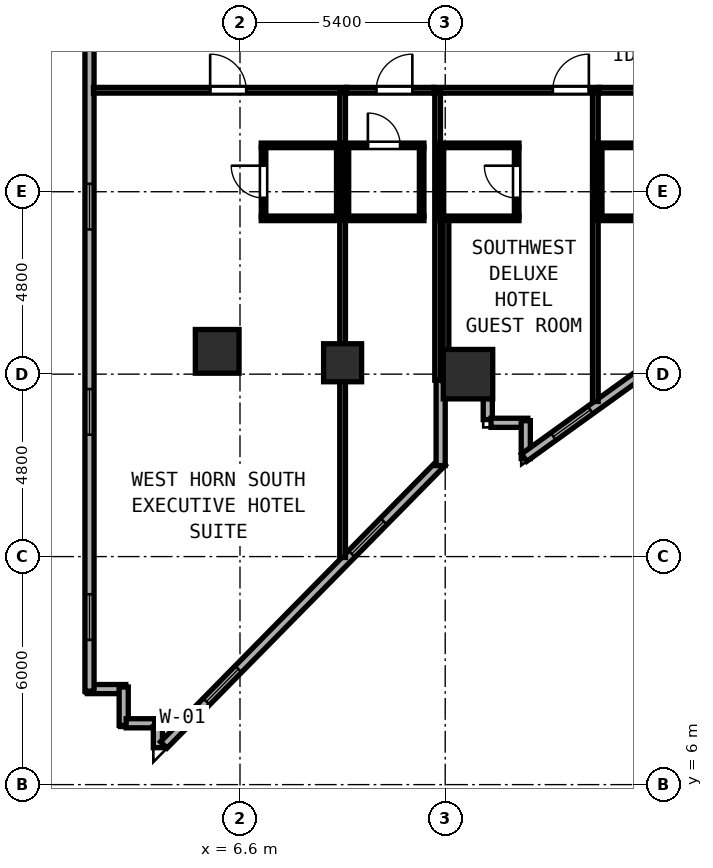
"""IFC4 building model, lengths in metres.
Left out: names, types, materials, properties, quantities, classifications, styles, units other than length and angle.
Written with IfcOpenShell. Run it as: python <this file> out.ifc"""

import sys

from ifc_helpers import new_model, si_unit, direction, frame, frame_2d, origin, origin_2d, place, context, subcontext, project, spatial, rectangle, hollow_rectangle, extrude, element, fill, save


model = new_model("IFC4")
c1 = context("Model", 3, precision=1e-05, world=origin(), true_north=direction((0.0, 1.0)))
c2 = subcontext(c1, "Body", "Model", "MODEL_VIEW")
j1 = project(units=[si_unit("LENGTHUNIT", "METRE"), si_unit("PLANEANGLEUNIT", "RADIAN")], contexts=[c1])
p1 = place(None, origin())
s1 = spatial("IfcSite", under=j1, at=p1, CompositionType="ELEMENT")
p2 = place(p1, origin())
s2 = spatial("IfcBuilding", under=s1, at=p2, CompositionType="ELEMENT")
p3 = place(p2, frame((0.0, 0.0, 39.2)))
s3 = spatial("IfcBuildingStorey", under=s2, at=p3, CompositionType="ELEMENT", Elevation=39.2)
p4 = place(p3, frame((12.6, 16.8, 0.0), z_axis=(0.0, 0.0, 1.0), x_axis=(1.0, 0.0, 0.0)))
e1 = element("IfcColumn", 1, at=p4, inside=s3, PredefinedType="COLUMN", context=c2, shape_type="SweptSolid", body=[
    extrude(hollow_rectangle(XDim=1.3, YDim=1.3, WallThickness=0.048, at=origin_2d()), origin(), (0.0, 0.0, 1.0), 3.8),
])
p5 = place(p3, frame((6.0, 17.4, 0.0), z_axis=(0.0, 0.0, 1.0), x_axis=(1.0, 0.0, 0.0)))
e2 = element("IfcColumn", 2, at=p5, inside=s3, PredefinedType="COLUMN", context=c2, shape_type="SweptSolid", body=[
    extrude(hollow_rectangle(XDim=1.15, YDim=1.15, WallThickness=0.042, at=origin_2d()), origin(), (0.0, 0.0, 1.0), 3.8),
])
p6 = place(p3, frame((9.3, 17.1, 0.0), z_axis=(0.0, 0.0, 1.0), x_axis=(1.0, 0.0, 0.0)))
e3 = element("IfcColumn", 3, at=p6, inside=s3, PredefinedType="COLUMN", context=c2, shape_type="SweptSolid", body=[
    extrude(hollow_rectangle(XDim=1.0, YDim=1.0, WallThickness=0.038, at=origin_2d()), origin(), (0.0, 0.0, 1.0), 3.8),
])
for number, where, z_axis, x_axis in (
    (4, (2.585, 8.514, 0.0), (0.0, 0.0, 1.0), (1.0, 0.0, 0.0)),
    (5, (3.54, 8.569, 0.0), (0.0, 0.0, 1.0), (0.0, -1.0, 0.0)),
):
    element("IfcWall", number, at=place(p3, frame(where, z_axis=z_axis, x_axis=x_axis)), inside=s3, PredefinedType="SOLIDWALL", context=c2, shape_type="SweptSolid", body=[
        extrude(rectangle(XDim=1.01, YDim=0.24, at=frame_2d((0.505, 0.0))), origin(), (0.0, 0.0, 1.0), 3.54),
    ])
p7 = place(p3, frame((3.605, 7.614, 0.0), z_axis=(0.0, 0.0, 1.0), x_axis=(1.0, 0.0, 0.0)))
e6 = element("IfcWall", 6, at=p7, inside=s3, PredefinedType="SOLIDWALL", context=c2, shape_type="SweptSolid", body=[
    extrude(rectangle(XDim=0.75, YDim=0.24, at=frame_2d((0.375, 0.0))), origin(), (0.0, 0.0, 1.0), 3.54),
])
p8 = place(p3, frame((4.44, 7.529, 0.0), z_axis=(0.0, 0.0, 1.0), x_axis=(0.0, -1.0, 0.0)))
e7 = element("IfcWall", 7, at=p8, inside=s3, PredefinedType="SOLIDWALL", context=c2, shape_type="SweptSolid", body=[
    extrude(rectangle(XDim=0.557, YDim=0.24, at=frame_2d((0.278, 0.0))), origin(), (0.0, 0.0, 1.0), 3.54),
])
p9 = place(p3, frame((4.594, 7.044, 0.0), z_axis=(0.0, 0.0, 1.0), x_axis=(0.701344347017, 0.712822633554, 0.0)))
e8 = element("IfcWall", 8, at=p9, inside=s3, PredefinedType="SOLIDWALL", context=c2, shape_type="SweptSolid", body=[
    extrude(rectangle(XDim=10.443, YDim=0.24, at=frame_2d((5.222, 0.0))), origin(), (0.0, 0.0, 1.0), 3.54),
])
p10 = place(p9, frame((1.6, 0.0, 0.85)))
e9 = element("IfcOpeningElement", 9, at=p10, cuts=e8, PredefinedType="OPENING", context=c2, shape_type="SweptSolid", body=[
    extrude(rectangle(XDim=1.2, YDim=1.85, at=frame_2d((0.6, 0.925))), frame((0.0, 0.13, 0.0), z_axis=(0.0, -1.0, 0.0), x_axis=(1.0, 0.0, 0.0)), (0.0, 0.0, 1.0), 0.26),
])
p11 = place(p9, frame((7.052, 0.0, 0.85)))
e10 = element("IfcOpeningElement", 10, at=p11, cuts=e8, PredefinedType="OPENING", context=c2, shape_type="SweptSolid", body=[
    extrude(rectangle(XDim=1.2, YDim=1.85, at=frame_2d((0.6, 0.925))), frame((0.0, 0.13, 0.0), z_axis=(0.0, -1.0, 0.0), x_axis=(1.0, 0.0, 0.0)), (0.0, 0.0, 1.0), 0.26),
])
p12 = place(p3, frame((11.88, 14.394, 0.0), z_axis=(0.0, 0.0, 1.0), x_axis=(0.0, 1.0, 0.0)))
e11 = element("IfcWall", 11, at=p12, inside=s3, PredefinedType="SOLIDWALL", context=c2, shape_type="SweptSolid", body=[
    extrude(rectangle(XDim=2.246, YDim=0.24, at=frame_2d((1.123, 0.0))), origin(), (0.0, 0.0, 1.0), 3.54),
])
p13 = place(p3, frame((13.12, 16.158, 0.0), z_axis=(0.0, 0.0, 1.0), x_axis=(0.0, -1.0, 0.0)))
e12 = element("IfcWall", 12, at=p13, inside=s3, PredefinedType="SOLIDWALL", context=c2, shape_type="SweptSolid", body=[
    extrude(rectangle(XDim=0.553, YDim=0.24, at=frame_2d((0.276, 0.0))), origin(), (0.0, 0.0, 1.0), 3.54),
])
p14 = place(p3, frame((13.205, 15.52, 0.0), z_axis=(0.0, 0.0, 1.0), x_axis=(1.0, 0.0, 0.0)))
e13 = element("IfcWall", 13, at=p14, inside=s3, PredefinedType="SOLIDWALL", context=c2, shape_type="SweptSolid", body=[
    extrude(rectangle(XDim=0.97, YDim=0.24, at=frame_2d((0.485, 0.0))), origin(), (0.0, 0.0, 1.0), 3.54),
])
p15 = place(p3, frame((14.12, 15.575, 0.0), z_axis=(0.0, 0.0, 1.0), x_axis=(0.0, -1.0, 0.0)))
e14 = element("IfcWall", 14, at=p15, inside=s3, PredefinedType="SOLIDWALL", context=c2, shape_type="SweptSolid", body=[
    extrude(rectangle(XDim=0.996, YDim=0.24, at=frame_2d((0.498, 0.0))), origin(), (0.0, 0.0, 1.0), 3.54),
])
p16 = place(p3, frame((14.075, 14.602, 0.0), z_axis=(0.0, 0.0, 1.0), x_axis=(0.811535555989, 0.584303038984, 0.0)))
e15 = element("IfcWall", 15, at=p16, inside=s3, PredefinedType="SOLIDWALL", context=c2, shape_type="SweptSolid", body=[
    extrude(rectangle(XDim=11.438, YDim=0.24, at=frame_2d((5.719, 0.0))), origin(), (0.0, 0.0, 1.0), 3.037),
])
p17 = place(p16, frame((0.95, 0.0, 0.85)))
e16 = element("IfcOpeningElement", 16, at=p17, cuts=e15, PredefinedType="OPENING", context=c2, shape_type="SweptSolid", body=[
    extrude(rectangle(XDim=1.2, YDim=1.85, at=frame_2d((0.6, 0.925))), frame((0.0, 0.13, 0.0), z_axis=(0.0, -1.0, 0.0), x_axis=(1.0, 0.0, 0.0)), (0.0, 0.0, 1.0), 0.26),
])
p18 = place(p16, frame((7.574, 0.0, 0.85)))
e17 = element("IfcOpeningElement", 17, at=p18, cuts=e15, PredefinedType="OPENING", context=c2, shape_type="SweptSolid", body=[
    extrude(rectangle(XDim=1.2, YDim=1.85, at=frame_2d((0.6, 0.925))), frame((0.0, 0.13, 0.0), z_axis=(0.0, -1.0, 0.0), x_axis=(1.0, 0.0, 0.0)), (0.0, 0.0, 1.0), 0.26),
])
p19 = place(p16, frame((4.262, 0.0, 0.85)))
e18 = element("IfcOpeningElement", 18, at=p19, cuts=e15, PredefinedType="OPENING", context=c2, shape_type="SweptSolid", body=[
    extrude(rectangle(XDim=1.2, YDim=1.85, at=frame_2d((0.6, 0.925))), frame((0.0, 0.13, 0.0), z_axis=(0.0, -1.0, 0.0), x_axis=(1.0, 0.0, 0.0)), (0.0, 0.0, 1.0), 0.26),
])
p20 = place(p3, frame((2.64, 28.808, 0.0), z_axis=(0.0, 0.0, 1.0), x_axis=(0.0, -1.0, 0.0)))
e19 = element("IfcWall", 19, at=p20, inside=s3, PredefinedType="SOLIDWALL", context=c2, shape_type="SweptSolid", body=[
    extrude(rectangle(XDim=20.349, YDim=0.24, at=frame_2d((10.175, 0.0))), origin(), (0.0, 0.0, 1.0), 3.54),
])
p21 = place(p20, frame((1.093, 0.0, 0.85)))
e20 = element("IfcOpeningElement", 20, at=p21, cuts=e19, PredefinedType="OPENING", context=c2, shape_type="SweptSolid", body=[
    extrude(rectangle(XDim=1.2, YDim=1.85, at=frame_2d((0.6, 0.925))), frame((0.0, 0.13, 0.0), z_axis=(0.0, -1.0, 0.0), x_axis=(1.0, 0.0, 0.0)), (0.0, 0.0, 1.0), 0.26),
])
p22 = place(p20, frame((7.0, 0.0, 0.85)))
e21 = element("IfcOpeningElement", 21, at=p22, cuts=e19, PredefinedType="OPENING", context=c2, shape_type="SweptSolid", body=[
    extrude(rectangle(XDim=1.2, YDim=1.85, at=frame_2d((0.6, 0.925))), frame((0.0, 0.13, 0.0), z_axis=(0.0, -1.0, 0.0), x_axis=(1.0, 0.0, 0.0)), (0.0, 0.0, 1.0), 0.26),
])
p23 = place(p20, frame((12.4, 0.0, 0.85)))
e22 = element("IfcOpeningElement", 22, at=p23, cuts=e19, PredefinedType="OPENING", context=c2, shape_type="SweptSolid", body=[
    extrude(rectangle(XDim=1.2, YDim=1.85, at=frame_2d((0.6, 0.925))), frame((0.0, 0.13, 0.0), z_axis=(0.0, -1.0, 0.0), x_axis=(1.0, 0.0, 0.0)), (0.0, 0.0, 1.0), 0.26),
])
p24 = place(p20, frame((17.8, 0.0, 0.85)))
e23 = element("IfcOpeningElement", 23, at=p24, cuts=e19, PredefinedType="OPENING", context=c2, shape_type="SweptSolid", body=[
    extrude(rectangle(XDim=1.2, YDim=1.85, at=frame_2d((0.6, 0.925))), frame((0.0, 0.13, 0.0), z_axis=(0.0, -1.0, 0.0), x_axis=(1.0, 0.0, 0.0)), (0.0, 0.0, 1.0), 0.26),
])
p25 = place(p3, frame((11.7, 24.27, 0.0), z_axis=(0.0, 0.0, 1.0), x_axis=(1.0, 0.0, 0.0)))
e24 = element("IfcWall", 24, at=p25, inside=s3, PredefinedType="PARTITIONING", context=c2, shape_type="SweptSolid", body=[
    extrude(rectangle(XDim=4.35, YDim=0.15, at=frame_2d((2.175, 0.0))), origin(), (0.0, 0.0, 1.0), 3.54),
])
p26 = place(p25, frame((4.08, 0.0, 0.0), z_axis=(0.0, 0.0, 1.0), x_axis=(-1.0, 0.0, 0.0)))
e25 = element("IfcOpeningElement", 25, at=p26, cuts=e24, PredefinedType="OPENING", context=c2, shape_type="SweptSolid", body=[
    extrude(rectangle(XDim=0.95, YDim=2.15, at=frame_2d((0.475, 1.075))), frame((0.0, 0.085, 0.0), z_axis=(0.0, -1.0, 0.0), x_axis=(1.0, 0.0, 0.0)), (0.0, 0.0, 1.0), 0.17),
])
p27 = place(p3, frame((11.8, 16.642, 0.0), z_axis=(0.0, 0.0, 1.0), x_axis=(0.0, 1.0, 0.0)))
e26 = element("IfcWall", 26, at=p27, inside=s3, PredefinedType="PARTITIONING", context=c2, shape_type="SweptSolid", body=[
    extrude(rectangle(XDim=7.568, YDim=0.15, at=frame_2d((3.784, 0.0))), origin(), (0.0, 0.0, 1.0), 3.54),
])
p28 = place(p3, frame((15.95, 16.081, 0.0), z_axis=(0.0, 0.0, 1.0), x_axis=(0.0, 1.0, 0.0)))
e27 = element("IfcWall", 27, at=p28, inside=s3, PredefinedType="PARTITIONING", context=c2, shape_type="SweptSolid", body=[
    extrude(rectangle(XDim=8.129, YDim=0.15, at=frame_2d((4.064, 0.0))), origin(), (0.0, 0.0, 1.0), 3.54),
])
for number, where, z_axis, x_axis in (
    (28, (11.86, 22.82, 0.0), (0.0, 0.0, 1.0), (1.0, 0.0, 0.0)),
    (29, (11.86, 20.9, 0.0), (0.0, 0.0, 1.0), (1.0, 0.0, 0.0)),
):
    element("IfcWall", number, at=place(p3, frame(where, z_axis=z_axis, x_axis=x_axis)), inside=s3, PredefinedType="PARTITIONING", context=c2, shape_type="SweptSolid", body=[
        extrude(rectangle(XDim=2.08, YDim=0.12, at=frame_2d((1.04, 0.0))), origin(), (0.0, 0.0, 1.0), 3.54),
    ])
p29 = place(p3, frame((11.9, 20.945, 0.0), z_axis=(0.0, 0.0, 1.0), x_axis=(0.0, 1.0, 0.0)))
e30 = element("IfcWall", 30, at=p29, inside=s3, PredefinedType="PARTITIONING", context=c2, shape_type="SweptSolid", body=[
    extrude(rectangle(XDim=1.83, YDim=0.12, at=frame_2d((0.915, 0.0))), origin(), (0.0, 0.0, 1.0), 3.54),
])
p30 = place(p3, frame((13.88, 20.945, 0.0), z_axis=(0.0, 0.0, 1.0), x_axis=(0.0, 1.0, 0.0)))
e31 = element("IfcWall", 31, at=p30, inside=s3, PredefinedType="PARTITIONING", context=c2, shape_type="SweptSolid", body=[
    extrude(rectangle(XDim=1.83, YDim=0.12, at=frame_2d((0.915, 0.0))), origin(), (0.0, 0.0, 1.0), 3.54),
])
p31 = place(p30, frame((0.49, 0.0, 0.0)))
e32 = element("IfcOpeningElement", 32, at=p31, cuts=e31, PredefinedType="OPENING", context=c2, shape_type="SweptSolid", body=[
    extrude(rectangle(XDim=0.85, YDim=2.1, at=frame_2d((0.425, 1.05))), frame((0.0, 0.07, 0.0), z_axis=(0.0, -1.0, 0.0), x_axis=(1.0, 0.0, 0.0)), (0.0, 0.0, 1.0), 0.14),
])
p32 = place(p3, frame((16.052, 24.27, 0.0), z_axis=(0.0, 0.0, 1.0), x_axis=(1.0, 0.0, 0.0)))
e33 = element("IfcWall", 33, at=p32, inside=s3, PredefinedType="PARTITIONING", context=c2, shape_type="SweptSolid", body=[
    extrude(rectangle(XDim=4.018, YDim=0.15, at=frame_2d((2.009, 0.0))), origin(), (0.0, 0.0, 1.0), 3.54),
])
p33 = place(p32, frame((3.76, 0.0, 0.0), z_axis=(0.0, 0.0, 1.0), x_axis=(-1.0, 0.0, 0.0)))
e34 = element("IfcOpeningElement", 34, at=p33, cuts=e33, PredefinedType="OPENING", context=c2, shape_type="SweptSolid", body=[
    extrude(rectangle(XDim=0.95, YDim=2.15, at=frame_2d((0.475, 1.075))), frame((0.0, 0.085, 0.0), z_axis=(0.0, -1.0, 0.0), x_axis=(1.0, 0.0, 0.0)), (0.0, 0.0, 1.0), 0.17),
])
for number, where, z_axis, x_axis in (
    (35, (16.01, 22.82, 0.0), (0.0, 0.0, 1.0), (1.0, 0.0, 0.0)),
    (36, (16.01, 20.9, 0.0), (0.0, 0.0, 1.0), (1.0, 0.0, 0.0)),
):
    element("IfcWall", number, at=place(p3, frame(where, z_axis=z_axis, x_axis=x_axis)), inside=s3, PredefinedType="PARTITIONING", context=c2, shape_type="SweptSolid", body=[
        extrude(rectangle(XDim=2.095, YDim=0.12, at=frame_2d((1.047, 0.0))), origin(), (0.0, 0.0, 1.0), 3.54),
    ])
p34 = place(p3, frame((16.065, 20.945, 0.0), z_axis=(0.0, 0.0, 1.0), x_axis=(0.0, 1.0, 0.0)))
e37 = element("IfcWall", 37, at=p34, inside=s3, PredefinedType="PARTITIONING", context=c2, shape_type="SweptSolid", body=[
    extrude(rectangle(XDim=1.83, YDim=0.12, at=frame_2d((0.915, 0.0))), origin(), (0.0, 0.0, 1.0), 3.54),
])
p35 = place(p3, frame((2.745, 24.27, 0.0), z_axis=(0.0, 0.0, 1.0), x_axis=(1.0, 0.0, 0.0)))
e38 = element("IfcWall", 38, at=p35, inside=s3, PredefinedType="PARTITIONING", context=c2, shape_type="SweptSolid", body=[
    extrude(rectangle(XDim=6.655, YDim=0.15, at=frame_2d((3.327, 0.0))), origin(), (0.0, 0.0, 1.0), 3.54),
])
p36 = place(p35, frame((4.02, 0.0, 0.0), z_axis=(0.0, 0.0, 1.0), x_axis=(-1.0, 0.0, 0.0)))
e39 = element("IfcOpeningElement", 39, at=p36, cuts=e38, PredefinedType="OPENING", context=c2, shape_type="SweptSolid", body=[
    extrude(rectangle(XDim=0.95, YDim=2.18, at=frame_2d((0.475, 1.09))), frame((0.0, 0.085, 0.0), z_axis=(0.0, -1.0, 0.0), x_axis=(1.0, 0.0, 0.0)), (0.0, 0.0, 1.0), 0.17),
])
p37 = place(p3, frame((9.3, 11.977, 0.0), z_axis=(0.0, 0.0, 1.0), x_axis=(0.0, 1.0, 0.0)))
e40 = element("IfcWall", 40, at=p37, inside=s3, PredefinedType="PARTITIONING", context=c2, shape_type="SweptSolid", body=[
    extrude(rectangle(XDim=12.233, YDim=0.15, at=frame_2d((6.117, 0.0))), origin(), (0.0, 0.0, 1.0), 3.54),
])
for number, where, z_axis, x_axis in (
    (41, (7.16, 22.82, 0.0), (0.0, 0.0, 1.0), (1.0, 0.0, 0.0)),
    (42, (7.16, 20.9, 0.0), (0.0, 0.0, 1.0), (1.0, 0.0, 0.0)),
):
    element("IfcWall", number, at=place(p3, frame(where, z_axis=z_axis, x_axis=x_axis)), inside=s3, PredefinedType="PARTITIONING", context=c2, shape_type="SweptSolid", body=[
        extrude(rectangle(XDim=2.08, YDim=0.12, at=frame_2d((1.04, 0.0))), origin(), (0.0, 0.0, 1.0), 3.54),
    ])
p38 = place(p3, frame((7.22, 20.945, 0.0), z_axis=(0.0, 0.0, 1.0), x_axis=(0.0, 1.0, 0.0)))
e43 = element("IfcWall", 43, at=p38, inside=s3, PredefinedType="PARTITIONING", context=c2, shape_type="SweptSolid", body=[
    extrude(rectangle(XDim=1.83, YDim=0.12, at=frame_2d((0.915, 0.0))), origin(), (0.0, 0.0, 1.0), 3.54),
])
p39 = place(p38, frame((1.34, 0.0, 0.0), z_axis=(0.0, 0.0, 1.0), x_axis=(-1.0, 0.0, 0.0)))
e44 = element("IfcOpeningElement", 44, at=p39, cuts=e43, PredefinedType="OPENING", context=c2, shape_type="SweptSolid", body=[
    extrude(rectangle(XDim=0.85, YDim=2.1, at=frame_2d((0.425, 1.05))), frame((0.0, 0.07, 0.0), z_axis=(0.0, -1.0, 0.0), x_axis=(1.0, 0.0, 0.0)), (0.0, 0.0, 1.0), 0.14),
])
p40 = place(p3, frame((9.2, 20.945, 0.0), z_axis=(0.0, 0.0, 1.0), x_axis=(0.0, 1.0, 0.0)))
e45 = element("IfcWall", 45, at=p40, inside=s3, PredefinedType="PARTITIONING", context=c2, shape_type="SweptSolid", body=[
    extrude(rectangle(XDim=1.83, YDim=0.12, at=frame_2d((0.915, 0.0))), origin(), (0.0, 0.0, 1.0), 3.54),
])
p41 = place(p3, frame((9.402, 24.27, 0.0), z_axis=(0.0, 0.0, 1.0), x_axis=(1.0, 0.0, 0.0)))
e46 = element("IfcWall", 46, at=p41, inside=s3, PredefinedType="PARTITIONING", context=c2, shape_type="SweptSolid", body=[
    extrude(rectangle(XDim=2.296, YDim=0.15, at=frame_2d((1.148, 0.0))), origin(), (0.0, 0.0, 1.0), 3.54),
])
p42 = place(p41, frame((1.733, 0.0, 0.0), z_axis=(0.0, 0.0, 1.0), x_axis=(-1.0, 0.0, 0.0)))
e47 = element("IfcOpeningElement", 47, at=p42, cuts=e46, PredefinedType="OPENING", context=c2, shape_type="SweptSolid", body=[
    extrude(rectangle(XDim=0.95, YDim=2.15, at=frame_2d((0.475, 1.075))), frame((0.0, 0.085, 0.0), z_axis=(0.0, -1.0, 0.0), x_axis=(1.0, 0.0, 0.0)), (0.0, 0.0, 1.0), 0.17),
])
p43 = place(p3, frame((12.02, 16.612, 0.0), z_axis=(0.0, 0.0, 1.0), x_axis=(0.0, 1.0, 0.0)))
e48 = element("IfcWall", 48, at=p43, inside=s3, PredefinedType="PARTITIONING", context=c2, shape_type="SweptSolid", body=[
    extrude(rectangle(XDim=4.243, YDim=0.15, at=frame_2d((2.122, 0.0))), origin(), (0.0, 0.0, 1.0), 3.54),
])
p44 = place(p3, frame((9.36, 22.82, 0.0), z_axis=(0.0, 0.0, 1.0), x_axis=(1.0, 0.0, 0.0)))
e49 = element("IfcWall", 49, at=p44, inside=s3, PredefinedType="PARTITIONING", context=c2, shape_type="SweptSolid", body=[
    extrude(rectangle(XDim=2.08, YDim=0.12, at=frame_2d((1.04, 0.0))), origin(), (0.0, 0.0, 1.0), 3.54),
])
p45 = place(p44, frame((1.455, 0.0, 0.0), z_axis=(0.0, 0.0, 1.0), x_axis=(-1.0, 0.0, 0.0)))
e50 = element("IfcOpeningElement", 50, at=p45, cuts=e49, PredefinedType="OPENING", context=c2, shape_type="SweptSolid", body=[
    extrude(rectangle(XDim=0.85, YDim=2.1, at=frame_2d((0.425, 1.05))), frame((0.0, 0.07, 0.0), z_axis=(0.0, -1.0, 0.0), x_axis=(1.0, 0.0, 0.0)), (0.0, 0.0, 1.0), 0.14),
])
p46 = place(p3, frame((9.36, 20.9, 0.0), z_axis=(0.0, 0.0, 1.0), x_axis=(1.0, 0.0, 0.0)))
e51 = element("IfcWall", 51, at=p46, inside=s3, PredefinedType="PARTITIONING", context=c2, shape_type="SweptSolid", body=[
    extrude(rectangle(XDim=2.08, YDim=0.12, at=frame_2d((1.04, 0.0))), origin(), (0.0, 0.0, 1.0), 3.54),
])
for number, where, z_axis, x_axis in (
    (52, (9.4, 20.945, 0.0), (0.0, 0.0, 1.0), (0.0, 1.0, 0.0)),
    (53, (11.38, 20.945, 0.0), (0.0, 0.0, 1.0), (0.0, 1.0, 0.0)),
):
    element("IfcWall", number, at=place(p3, frame(where, z_axis=z_axis, x_axis=x_axis)), inside=s3, PredefinedType="PARTITIONING", context=c2, shape_type="SweptSolid", body=[
        extrude(rectangle(XDim=1.83, YDim=0.12, at=frame_2d((0.915, 0.0))), origin(), (0.0, 0.0, 1.0), 3.54),
    ])
p47 = place(p10, origin())
e54 = element("IfcWindow", 54, at=p47, inside=s3, PartitioningType="SINGLE_PANEL", PredefinedType="WINDOW", context=c2, shape_type="SweptSolid", body=[
    extrude(rectangle(XDim=1.2, YDim=1.85, at=frame_2d((0.6, 0.925))), frame((0.0, 0.03, 0.0), z_axis=(0.0, -1.0, 0.0), x_axis=(1.0, 0.0, 0.0)), (0.0, 0.0, 1.0), 0.06),
])
fill(e9, e54)
p48 = place(p11, origin())
e55 = element("IfcWindow", 55, at=p48, inside=s3, PartitioningType="SINGLE_PANEL", PredefinedType="WINDOW", context=c2, shape_type="SweptSolid", body=[
    extrude(rectangle(XDim=1.2, YDim=1.85, at=frame_2d((0.6, 0.925))), frame((0.0, 0.03, 0.0), z_axis=(0.0, -1.0, 0.0), x_axis=(1.0, 0.0, 0.0)), (0.0, 0.0, 1.0), 0.06),
])
fill(e10, e55)
p49 = place(p17, origin())
e56 = element("IfcWindow", 56, at=p49, inside=s3, PartitioningType="SINGLE_PANEL", PredefinedType="WINDOW", context=c2, shape_type="SweptSolid", body=[
    extrude(rectangle(XDim=1.2, YDim=1.85, at=frame_2d((0.6, 0.925))), frame((0.0, 0.03, 0.0), z_axis=(0.0, -1.0, 0.0), x_axis=(1.0, 0.0, 0.0)), (0.0, 0.0, 1.0), 0.06),
])
fill(e16, e56)
p50 = place(p22, origin())
e57 = element("IfcWindow", 57, at=p50, inside=s3, PartitioningType="SINGLE_PANEL", PredefinedType="WINDOW", context=c2, shape_type="SweptSolid", body=[
    extrude(rectangle(XDim=1.2, YDim=1.85, at=frame_2d((0.6, 0.925))), frame((0.0, 0.03, 0.0), z_axis=(0.0, -1.0, 0.0), x_axis=(1.0, 0.0, 0.0)), (0.0, 0.0, 1.0), 0.06),
])
fill(e21, e57)
p51 = place(p23, origin())
e58 = element("IfcWindow", 58, at=p51, inside=s3, PartitioningType="SINGLE_PANEL", PredefinedType="WINDOW", context=c2, shape_type="SweptSolid", body=[
    extrude(rectangle(XDim=1.2, YDim=1.85, at=frame_2d((0.6, 0.925))), frame((0.0, 0.03, 0.0), z_axis=(0.0, -1.0, 0.0), x_axis=(1.0, 0.0, 0.0)), (0.0, 0.0, 1.0), 0.06),
])
fill(e22, e58)
p52 = place(p24, origin())
e59 = element("IfcWindow", 59, at=p52, inside=s3, PartitioningType="SINGLE_PANEL", PredefinedType="WINDOW", context=c2, shape_type="SweptSolid", body=[
    extrude(rectangle(XDim=1.2, YDim=1.85, at=frame_2d((0.6, 0.925))), frame((0.0, 0.03, 0.0), z_axis=(0.0, -1.0, 0.0), x_axis=(1.0, 0.0, 0.0)), (0.0, 0.0, 1.0), 0.06),
])
fill(e23, e59)
p53 = place(p26, origin())
e60 = element("IfcDoor", 60, at=p53, inside=s3, OperationType="SINGLE_SWING_LEFT", PredefinedType="DOOR", context=c2, shape_type="SweptSolid", body=[
    extrude(rectangle(XDim=0.95, YDim=2.15, at=frame_2d((0.475, 1.075))), frame((0.0, 0.025, 0.0), z_axis=(0.0, -1.0, 0.0), x_axis=(1.0, 0.0, 0.0)), (0.0, 0.0, 1.0), 0.05),
])
fill(e25, e60)
p54 = place(p31, origin())
e61 = element("IfcDoor", 61, at=p54, inside=s3, OperationType="SINGLE_SWING_RIGHT", PredefinedType="DOOR", context=c2, shape_type="SweptSolid", body=[
    extrude(rectangle(XDim=0.85, YDim=2.1, at=frame_2d((0.425, 1.05))), frame((0.0, 0.025, 0.0), z_axis=(0.0, -1.0, 0.0), x_axis=(1.0, 0.0, 0.0)), (0.0, 0.0, 1.0), 0.05),
])
fill(e32, e61)
p55 = place(p36, origin())
e62 = element("IfcDoor", 62, at=p55, inside=s3, OperationType="SINGLE_SWING_RIGHT", PredefinedType="DOOR", context=c2, shape_type="SweptSolid", body=[
    extrude(rectangle(XDim=0.95, YDim=2.18, at=frame_2d((0.475, 1.09))), frame((0.0, 0.025, 0.0), z_axis=(0.0, -1.0, 0.0), x_axis=(1.0, 0.0, 0.0)), (0.0, 0.0, 1.0), 0.05),
])
fill(e39, e62)
p56 = place(p39, origin())
e63 = element("IfcDoor", 63, at=p56, inside=s3, OperationType="SINGLE_SWING_LEFT", PredefinedType="DOOR", context=c2, shape_type="SweptSolid", body=[
    extrude(rectangle(XDim=0.85, YDim=2.1, at=frame_2d((0.425, 1.05))), frame((0.0, 0.025, 0.0), z_axis=(0.0, -1.0, 0.0), x_axis=(1.0, 0.0, 0.0)), (0.0, 0.0, 1.0), 0.05),
])
fill(e44, e63)
p57 = place(p42, origin())
e64 = element("IfcDoor", 64, at=p57, inside=s3, OperationType="SINGLE_SWING_LEFT", PredefinedType="DOOR", context=c2, shape_type="SweptSolid", body=[
    extrude(rectangle(XDim=0.95, YDim=2.15, at=frame_2d((0.475, 1.075))), frame((0.0, 0.025, 0.0), z_axis=(0.0, -1.0, 0.0), x_axis=(1.0, 0.0, 0.0)), (0.0, 0.0, 1.0), 0.05),
])
fill(e47, e64)
p58 = place(p45, origin())
e65 = element("IfcDoor", 65, at=p58, inside=s3, OperationType="SINGLE_SWING_RIGHT", PredefinedType="DOOR", context=c2, shape_type="SweptSolid", body=[
    extrude(rectangle(XDim=0.85, YDim=2.1, at=frame_2d((0.425, 1.05))), frame((0.0, 0.025, 0.0), z_axis=(0.0, -1.0, 0.0), x_axis=(1.0, 0.0, 0.0)), (0.0, 0.0, 1.0), 0.05),
])
fill(e50, e65)
save(model, sys.argv[1])
